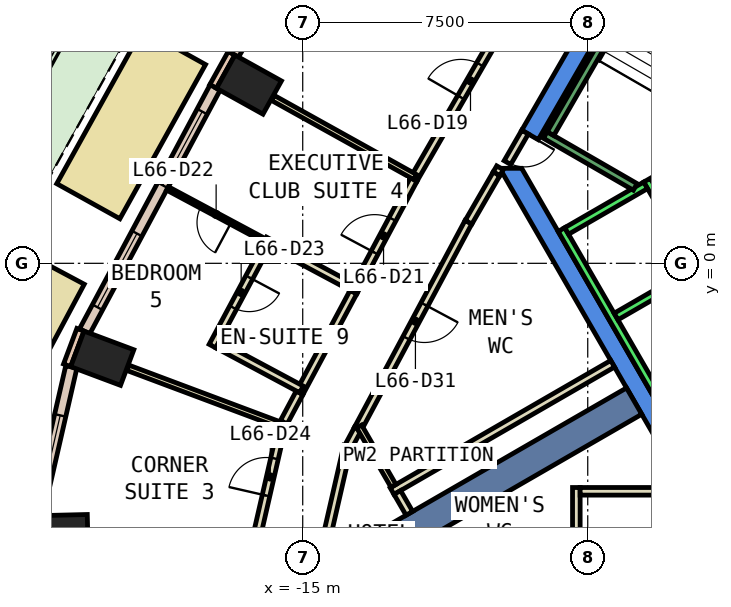
"""IFC4 building model, lengths in metres.
Left out: names, types, materials, properties, quantities, classifications, styles, units other than length and angle.
Written with IfcOpenShell. Run it as: python <this file> out.ifc"""

import sys

from ifc_helpers import new_model, si_unit, direction, frame, frame_2d, origin, origin_2d, place, context, subcontext, project, spatial, polyline, rectangle, outline, extrude, element, fill, save


model = new_model("IFC4")
c1 = context("Model", 3, precision=1e-05, world=origin(), true_north=direction((0.0, 1.0)))
c2 = subcontext(c1, "Body", "Model", "MODEL_VIEW")
j1 = project(units=[si_unit("LENGTHUNIT", "METRE"), si_unit("PLANEANGLEUNIT", "RADIAN")], contexts=[c1])
p1 = place(None, origin())
s1 = spatial("IfcSite", under=j1, at=p1, CompositionType="ELEMENT")
p2 = place(p1, origin())
s2 = spatial("IfcBuilding", under=s1, at=p2, CompositionType="ELEMENT")
p3 = place(p2, frame((0.0, 0.0, 286.4)))
s3 = spatial("IfcBuildingStorey", under=s2, at=p3, CompositionType="ELEMENT", Elevation=286.4)
for number, where, z_axis, x_axis in (
    (1, (-16.415, 4.702, 0.0), (0.0, 0.0, 1.0), (0.486, 0.874, 0.0)),
    (2, (-20.275, -2.497, 0.0), (0.0, 0.0, 1.0), (0.351, 0.936, 0.0)),
    (3, (-21.357, -7.126, 0.0), (0.0, 0.0, 1.0), (-0.024, 1.0, 0.0)),
):
    element("IfcColumn", number, at=place(p3, frame(where, z_axis=z_axis, x_axis=x_axis)), inside=s3, PredefinedType="COLUMN", context=c2, shape_type="SweptSolid", body=[
        extrude(rectangle(XDim=1.0, YDim=1.4, at=origin_2d()), origin(), (0.0, 0.0, 1.0), 3.26),
    ])
p4 = place(p3, frame((0.0, 0.0, -0.6)))
e4 = element("IfcWall", 4, at=p4, inside=s3, PredefinedType="SHEAR", context=c2, shape_type="SweptSolid", body=[
    extrude(outline(polyline([(-9.236, 3.502), (-8.803, 3.253), (-4.619, 10.5), (-4.907, 11.0), (-9.236, 3.502)])), origin(), (0.0, 0.0, 1.0), 3.86),
])
p5 = place(p3, frame((0.0, 0.0, -0.6)))
e5 = element("IfcWall", 5, at=p5, inside=s3, PredefinedType="SHEAR", context=c2, shape_type="SweptSolid", body=[
    extrude(outline(polyline([(-9.815, 2.5), (-4.907, -6.0), (-4.619, -5.5), (-9.238, 2.5), (-9.815, 2.5)])), origin(), (0.0, 0.0, 1.0), 3.86),
])
p6 = place(p3, frame((-6.279, -3.625, -0.6), z_axis=(0.0, 0.0, 1.0), x_axis=(-0.866017533419, -0.500013631625, 0.0)))
e6 = element("IfcWall", 6, at=p6, inside=s3, PredefinedType="SHEAR", context=c2, shape_type="SweptSolid", body=[
    extrude(rectangle(XDim=9.0, YDim=0.8, at=frame_2d((4.5, 0.0))), origin(), (0.0, 0.0, 1.0), 3.86),
])
p7 = place(p3, frame((-16.872, 5.527, 0.0), z_axis=(0.0, 0.0, 1.0), x_axis=(-0.485850211157, -0.874042088414, 0.0)))
e7 = element("IfcWall", 7, at=p7, inside=s3, PredefinedType="STANDARD", context=c2, shape_type="SweptSolid", body=[
    extrude(rectangle(XDim=1.0, YDim=0.2, at=frame_2d((0.5, 0.0))), origin(), (0.0, 0.0, 1.0), 3.26),
])
p8 = place(p3, frame((-20.849, -1.748, 0.0), z_axis=(0.0, 0.0, 1.0), x_axis=(-0.350962844851, -0.936389385637, 0.0)))
e8 = element("IfcWall", 8, at=p8, inside=s3, PredefinedType="STANDARD", context=c2, shape_type="SweptSolid", body=[
    extrude(rectangle(XDim=1.0, YDim=0.2, at=frame_2d((0.5, 0.0))), origin(), (0.0, 0.0, 1.0), 3.26),
])
p9 = place(p3, frame((-13.172, 11.819, 0.0), z_axis=(0.0, 0.0, 1.0), x_axis=(-0.499945412946, -0.866056917341, 0.0)))
e9 = element("IfcWall", 9, at=p9, inside=s3, PredefinedType="STANDARD", context=c2, shape_type="SweptSolid", body=[
    extrude(rectangle(XDim=7.299, YDim=0.3, at=frame_2d((3.649, 0.0))), origin(), (0.0, 0.0, 1.0), 3.26),
])
p10 = place(p9, frame((0.825, 0.0, 0.0)))
e10 = element("IfcOpeningElement", 10, at=p10, cuts=e9, PredefinedType="OPENING", context=c2, shape_type="SweptSolid", body=[
    extrude(rectangle(XDim=2.0, YDim=2.4, at=frame_2d((1.0, 1.2))), frame((0.0, 0.16, 0.0), z_axis=(0.0, -1.0, 0.0), x_axis=(1.0, 0.0, 0.0)), (0.0, 0.0, 1.0), 0.32),
])
p11 = place(p9, frame((4.374, 0.0, 0.9)))
e11 = element("IfcOpeningElement", 11, at=p11, cuts=e9, PredefinedType="OPENING", context=c2, shape_type="SweptSolid", body=[
    extrude(rectangle(XDim=2.2, YDim=2.0, at=frame_2d((1.1, 1.0))), frame((0.0, 0.16, 0.0), z_axis=(0.0, -1.0, 0.0), x_axis=(1.0, 0.0, 0.0)), (0.0, 0.0, 1.0), 0.32),
])
p12 = place(p3, frame((-17.306, 4.626, 0.0), z_axis=(0.0, 0.0, 1.0), x_axis=(-0.471789353675, -0.881711293882, 0.0)))
e12 = element("IfcWall", 12, at=p12, inside=s3, PredefinedType="STANDARD", context=c2, shape_type="SweptSolid", body=[
    extrude(rectangle(XDim=7.277, YDim=0.3, at=frame_2d((3.638, 0.0))), origin(), (0.0, 0.0, 1.0), 3.26),
])
p13 = place(p12, frame((0.719, 0.0, 0.9)))
e13 = element("IfcOpeningElement", 13, at=p13, cuts=e12, PredefinedType="OPENING", context=c2, shape_type="SweptSolid", body=[
    extrude(rectangle(XDim=2.2, YDim=2.0, at=frame_2d((1.1, 1.0))), frame((0.0, 0.16, 0.0), z_axis=(0.0, -1.0, 0.0), x_axis=(1.0, 0.0, 0.0)), (0.0, 0.0, 1.0), 0.32),
])
p14 = place(p12, frame((4.358, 0.0, 0.9)))
e14 = element("IfcOpeningElement", 14, at=p14, cuts=e12, PredefinedType="OPENING", context=c2, shape_type="SweptSolid", body=[
    extrude(rectangle(XDim=2.2, YDim=2.0, at=frame_2d((1.1, 1.0))), frame((0.0, 0.16, 0.0), z_axis=(0.0, -1.0, 0.0), x_axis=(1.0, 0.0, 0.0)), (0.0, 0.0, 1.0), 0.32),
])
p15 = place(p3, frame((-21.089, -2.725, 0.0), z_axis=(0.0, 0.0, 1.0), x_axis=(-0.223448307338, -0.974715781112, 0.0)))
e15 = element("IfcWall", 15, at=p15, inside=s3, PredefinedType="STANDARD", context=c2, shape_type="SweptSolid", body=[
    extrude(rectangle(XDim=4.019, YDim=0.3, at=frame_2d((2.009, 0.0))), origin(), (0.0, 0.0, 1.0), 3.26),
])
p16 = place(p15, frame((1.309, 0.0, 0.9)))
e16 = element("IfcOpeningElement", 16, at=p16, cuts=e15, PredefinedType="OPENING", context=c2, shape_type="SweptSolid", body=[
    extrude(rectangle(XDim=1.4, YDim=2.0, at=frame_2d((0.7, 1.0))), frame((0.0, 0.16, 0.0), z_axis=(0.0, -1.0, 0.0), x_axis=(1.0, 0.0, 0.0)), (0.0, 0.0, 1.0), 0.32),
])
p17 = place(p3, frame((-18.388, 5.691, 0.0), z_axis=(0.0, 0.0, 1.0), x_axis=(-0.485696527213, -0.874127498397, 0.0)))
e17 = element("IfcWall", 17, at=p17, inside=s3, PredefinedType="STANDARD", context=c2, shape_type="SweptSolid", body=[
    extrude(rectangle(XDim=4.641, YDim=1.9, at=frame_2d((2.321, 0.0))), origin(), (0.0, 0.0, 1.0), 0.8),
])
p18 = place(p3, frame((-21.587, -0.103, 0.0), z_axis=(0.0, 0.0, 1.0), x_axis=(-0.470902401725, -0.882185313894, 0.0)))
e18 = element("IfcWall", 18, at=p18, inside=s3, PredefinedType="STANDARD", context=c2, shape_type="SweptSolid", body=[
    extrude(rectangle(XDim=4.799, YDim=1.9, at=frame_2d((2.4, 0.0))), origin(), (0.0, 0.0, 1.0), 0.8),
])
p19 = place(p3, frame((-9.809, 2.514, 0.0), z_axis=(0.0, 0.0, 1.0), x_axis=(-0.497849076449, -0.867263683708, 0.0)))
e19 = element("IfcWall", 19, at=p19, inside=s3, PredefinedType="PARTITIONING", context=c2, shape_type="SweptSolid", body=[
    extrude(rectangle(XDim=0.184, YDim=0.2, at=frame_2d((0.092, 0.0))), origin(), (0.0, 0.0, 1.0), 2.4),
])
p20 = place(p3, frame((-10.639, 1.084, 0.0), z_axis=(0.0, 0.0, 1.0), x_axis=(-0.471696599276, -0.881760918975, 0.0)))
e20 = element("IfcWall", 20, at=p20, inside=s3, PredefinedType="PARTITIONING", context=c2, shape_type="SweptSolid", body=[
    extrude(rectangle(XDim=6.172, YDim=0.2, at=frame_2d((3.086, 0.0))), origin(), (0.0, 0.0, 1.0), 3.26),
])
p21 = place(p20, frame((2.458, 0.0, 0.0)))
e21 = element("IfcOpeningElement", 21, at=p21, cuts=e20, PredefinedType="OPENING", context=c2, shape_type="SweptSolid", body=[
    extrude(rectangle(XDim=1.0, YDim=2.1, at=frame_2d((0.5, 1.05))), frame((0.0, 0.11, 0.0), z_axis=(0.0, -1.0, 0.0), x_axis=(1.0, 0.0, 0.0)), (0.0, 0.0, 1.0), 0.22),
])
p22 = place(p3, frame((-13.55, -4.358, 0.0), z_axis=(0.0, 0.0, 1.0), x_axis=(-0.472169364753, -0.881507850781, 0.0)))
e22 = element("IfcWall", 22, at=p22, inside=s3, PredefinedType="PARTITIONING", context=c2, shape_type="SweptSolid", body=[
    extrude(rectangle(XDim=0.521, YDim=0.2, at=frame_2d((0.26, 0.0))), origin(), (0.0, 0.0, 1.0), 3.26),
])
p23 = place(p3, frame((-13.821, -4.808, 0.0), z_axis=(0.0, 0.0, 1.0), x_axis=(-0.223248099856, -0.97476165595, 0.0)))
e23 = element("IfcWall", 23, at=p23, inside=s3, PredefinedType="PARTITIONING", context=c2, shape_type="SweptSolid", body=[
    extrude(rectangle(XDim=2.302, YDim=0.2, at=frame_2d((1.151, 0.0))), origin(), (0.0, 0.0, 1.0), 3.26),
])
p24 = place(p3, frame((-12.082, 2.207, 0.0), z_axis=(0.0, 0.0, 1.0), x_axis=(0.500123454404, 0.865954115618, 0.0)))
e24 = element("IfcWall", 24, at=p24, inside=s3, PredefinedType="PARTITIONING", context=c2, shape_type="SweptSolid", body=[
    extrude(rectangle(XDim=5.885, YDim=0.2, at=frame_2d((2.942, 0.0))), origin(), (0.0, 0.0, 1.0), 3.26),
])
p25 = place(p24, frame((2.493, 0.0, 0.0)))
e25 = element("IfcOpeningElement", 25, at=p25, cuts=e24, PredefinedType="OPENING", context=c2, shape_type="SweptSolid", body=[
    extrude(rectangle(XDim=1.0, YDim=2.1, at=frame_2d((0.5, 1.05))), frame((0.0, 0.11, 0.0), z_axis=(0.0, -1.0, 0.0), x_axis=(1.0, 0.0, 0.0)), (0.0, 0.0, 1.0), 0.22),
])
p26 = place(p3, frame((-13.666, -0.76, 0.0), z_axis=(0.0, 0.0, 1.0), x_axis=(0.471643060173, 0.881789557543, 0.0)))
e26 = element("IfcWall", 26, at=p26, inside=s3, PredefinedType="PARTITIONING", context=c2, shape_type="SweptSolid", body=[
    extrude(rectangle(XDim=3.363, YDim=0.2, at=frame_2d((1.681, 0.0))), origin(), (0.0, 0.0, 1.0), 3.26),
])
p27 = place(p26, frame((1.181, 0.0, 0.0)))
e27 = element("IfcOpeningElement", 27, at=p27, cuts=e26, PredefinedType="OPENING", context=c2, shape_type="SweptSolid", body=[
    extrude(rectangle(XDim=1.0, YDim=2.1, at=frame_2d((0.5, 1.05))), frame((0.0, 0.11, 0.0), z_axis=(0.0, -1.0, 0.0), x_axis=(1.0, 0.0, 0.0)), (0.0, 0.0, 1.0), 0.22),
])
p28 = place(p3, frame((-15.496, -4.18, 0.0), z_axis=(0.0, 0.0, 1.0), x_axis=(0.471280380621, 0.881983448167, 0.0)))
e28 = element("IfcWall", 28, at=p28, inside=s3, PredefinedType="PARTITIONING", context=c2, shape_type="SweptSolid", body=[
    extrude(rectangle(XDim=0.879, YDim=0.2, at=frame_2d((0.439, 0.0))), origin(), (0.0, 0.0, 1.0), 3.26),
])
p29 = place(p3, frame((-15.082, -3.405, 0.0), z_axis=(0.0, 0.0, 1.0), x_axis=(0.471719946084, 0.88174842924, 0.0)))
e29 = element("IfcWall", 29, at=p29, inside=s3, PredefinedType="PARTITIONING", context=c2, shape_type="SweptSolid", body=[
    extrude(rectangle(XDim=3.0, YDim=0.2, at=frame_2d((1.5, 0.0))), origin(), (0.0, 0.0, 1.0), 3.26),
])
p30 = place(p3, frame((-16.192, -7.098, 0.0), z_axis=(0.0, 0.0, 1.0), x_axis=(0.22330023395, 0.974749714295, 0.0)))
e30 = element("IfcWall", 30, at=p30, inside=s3, PredefinedType="PARTITIONING", context=c2, shape_type="SweptSolid", body=[
    extrude(rectangle(XDim=2.928, YDim=0.2, at=frame_2d((1.464, 0.0))), origin(), (0.0, 0.0, 1.0), 3.26),
])
p31 = place(p30, frame((1.014, 0.0, 0.0)))
e31 = element("IfcOpeningElement", 31, at=p31, cuts=e30, PredefinedType="OPENING", context=c2, shape_type="SweptSolid", body=[
    extrude(rectangle(XDim=1.0, YDim=2.1, at=frame_2d((0.5, 1.05))), frame((0.0, 0.11, 0.0), z_axis=(0.0, -1.0, 0.0), x_axis=(1.0, 0.0, 0.0)), (0.0, 0.0, 1.0), 0.22),
])
p32 = place(p3, frame((-7.8, -9.775, 0.0), z_axis=(0.0, 0.0, 1.0), x_axis=(0.0, 1.0, 0.0)))
e32 = element("IfcWall", 32, at=p32, inside=s3, PredefinedType="PARTITIONING", context=c2, shape_type="SweptSolid", body=[
    extrude(rectangle(XDim=3.876, YDim=0.2, at=frame_2d((1.938, 0.0))), origin(), (0.0, 0.0, 1.0), 3.26),
])
p33 = place(p32, frame((1.438, 0.0, 0.0)))
e33 = element("IfcOpeningElement", 33, at=p33, cuts=e32, PredefinedType="OPENING", context=c2, shape_type="SweptSolid", body=[
    extrude(rectangle(XDim=1.0, YDim=2.1, at=frame_2d((0.5, 1.05))), frame((0.0, 0.11, 0.0), z_axis=(0.0, -1.0, 0.0), x_axis=(1.0, 0.0, 0.0)), (0.0, 0.0, 1.0), 0.22),
])
p34 = place(p3, frame((-7.7, -5.999, 0.0), z_axis=(0.0, 0.0, 1.0), x_axis=(1.0, 0.0, 0.0)))
e34 = element("IfcWall", 34, at=p34, inside=s3, PredefinedType="PARTITIONING", context=c2, shape_type="SweptSolid", body=[
    extrude(rectangle(XDim=2.792, YDim=0.2, at=frame_2d((1.396, 0.0))), origin(), (0.0, 0.0, 1.0), 3.26),
])
p35 = place(p3, frame((-6.845, -2.643, 0.0), z_axis=(0.0, 0.0, 1.0), x_axis=(-0.865994457699, -0.500053596362, 0.0)))
e35 = element("IfcWall", 35, at=p35, inside=s3, PredefinedType="PARTITIONING", context=c2, shape_type="SweptSolid", body=[
    extrude(rectangle(XDim=6.701, YDim=0.2, at=frame_2d((3.351, 0.0))), origin(), (0.0, 0.0, 1.0), 3.26),
])
p36 = place(p3, frame((-12.611, -5.857, 0.0), z_axis=(0.0, 0.0, 1.0), x_axis=(-0.500120037633, 0.865956088932, 0.0)))
e36 = element("IfcWall", 36, at=p36, inside=s3, PredefinedType="PARTITIONING", context=c2, shape_type="SweptSolid", body=[
    extrude(rectangle(XDim=1.807, YDim=0.15, at=frame_2d((0.904, 0.0))), origin(), (0.0, 0.0, 1.0), 3.26),
])
p37 = place(p3, frame((-12.045, 2.272, 0.0), z_axis=(0.0, 0.0, 1.0), x_axis=(-0.873982340973, 0.485957680943, 0.0)))
e37 = element("IfcWall", 37, at=p37, inside=s3, PredefinedType="PARTITIONING", context=c2, shape_type="SweptSolid", body=[
    extrude(rectangle(XDim=4.28, YDim=0.15, at=frame_2d((2.14, 0.0))), origin(), (0.0, 0.0, 1.0), 3.26),
])
p38 = place(p3, frame((-16.0, 0.602, 0.0), z_axis=(0.0, 0.0, 1.0), x_axis=(-0.881743923375, 0.47172836844, 0.0)))
e38 = element("IfcWall", 38, at=p38, inside=s3, PredefinedType="PARTITIONING", context=c2, shape_type="SweptSolid", body=[
    extrude(rectangle(XDim=2.9, YDim=0.1, at=frame_2d((1.45, 0.0))), origin(), (0.0, 0.0, 1.0), 3.26),
])
p39 = place(p38, frame((1.0, 0.0, 0.0)))
e39 = element("IfcOpeningElement", 39, at=p39, cuts=e38, PredefinedType="OPENING", context=c2, shape_type="SweptSolid", body=[
    extrude(rectangle(XDim=0.9, YDim=2.1, at=frame_2d((0.45, 1.05))), frame((0.0, 0.06, 0.0), z_axis=(0.0, -1.0, 0.0), x_axis=(1.0, 0.0, 0.0)), (0.0, 0.0, 1.0), 0.12),
])
p40 = place(p3, frame((-13.707, -0.624, 0.0), z_axis=(0.0, 0.0, 1.0), x_axis=(-0.881825950813, 0.471575012562, 0.0)))
e40 = element("IfcWall", 40, at=p40, inside=s3, PredefinedType="PARTITIONING", context=c2, shape_type="SweptSolid", body=[
    extrude(rectangle(XDim=2.401, YDim=0.2, at=frame_2d((1.2, 0.0))), origin(), (0.0, 0.0, 1.0), 3.26),
])
p41 = place(p3, frame((-15.865, 0.643, 0.0), z_axis=(0.0, 0.0, 1.0), x_axis=(-0.471677088066, -0.881771356188, 0.0)))
e41 = element("IfcWall", 41, at=p41, inside=s3, PredefinedType="PARTITIONING", context=c2, shape_type="SweptSolid", body=[
    extrude(rectangle(XDim=3.199, YDim=0.2, at=frame_2d((1.6, 0.0))), origin(), (0.0, 0.0, 1.0), 3.26),
])
p42 = place(p41, frame((1.15, 0.0, 0.0)))
e42 = element("IfcOpeningElement", 42, at=p42, cuts=e41, PredefinedType="OPENING", context=c2, shape_type="SweptSolid", body=[
    extrude(rectangle(XDim=0.9, YDim=2.1, at=frame_2d((0.45, 1.05))), frame((0.0, 0.11, 0.0), z_axis=(0.0, -1.0, 0.0), x_axis=(1.0, 0.0, 0.0)), (0.0, 0.0, 1.0), 0.22),
])
p43 = place(p3, frame((-17.239, -2.137, 0.0), z_axis=(0.0, 0.0, 1.0), x_axis=(0.881706262609, -0.471798756332, 0.0)))
e43 = element("IfcWall", 43, at=p43, inside=s3, PredefinedType="PARTITIONING", context=c2, shape_type="SweptSolid", body=[
    extrude(rectangle(XDim=2.501, YDim=0.2, at=frame_2d((1.25, 0.0))), origin(), (0.0, 0.0, 1.0), 3.26),
])
p44 = place(p3, frame((-15.45, -4.304, 0.0), z_axis=(0.0, 0.0, 1.0), x_axis=(-0.936458128132, 0.350779381172, 0.0)))
e44 = element("IfcWall", 44, at=p44, inside=s3, PredefinedType="PARTITIONING", context=c2, shape_type="SweptSolid", body=[
    extrude(rectangle(XDim=4.433, YDim=0.15, at=frame_2d((2.216, 0.0))), origin(), (0.0, 0.0, 1.0), 3.26),
])
p45 = place(p3, frame((-9.15, 3.452, 0.0), z_axis=(0.0, 0.0, 1.0), x_axis=(-0.500079945886, -0.865979242085, 0.0)))
e45 = element("IfcWall", 45, at=p45, inside=s3, PredefinedType="PARTITIONING", context=c2, shape_type="SweptSolid", body=[
    extrude(rectangle(XDim=0.926, YDim=0.2, at=frame_2d((0.463, 0.0))), origin(), (0.0, 0.0, 1.0), 2.4),
])
p46 = place(p45, frame((0.017, 0.0, 0.0)))
e46 = element("IfcOpeningElement", 46, at=p46, cuts=e45, PredefinedType="OPENING", context=c2, shape_type="SweptSolid", body=[
    extrude(rectangle(XDim=0.9, YDim=2.1, at=frame_2d((0.45, 1.05))), frame((0.0, 0.11, 0.0), z_axis=(0.0, -1.0, 0.0), x_axis=(1.0, 0.0, 0.0)), (0.0, 0.0, 1.0), 0.22),
])
p47 = place(p3, frame((-12.194, -6.578, 0.0), z_axis=(0.0, 0.0, 1.0), x_axis=(-0.500701704226, 0.865619895442, 0.0)))
e47 = element("IfcWall", 47, at=p47, inside=s3, PredefinedType="PARTITIONING", context=c2, shape_type="SweptSolid", body=[
    extrude(rectangle(XDim=0.633, YDim=0.2, at=frame_2d((0.316, 0.0))), origin(), (0.0, 0.0, 1.0), 3.26),
])
p48 = place(p3, frame((-9.901, 2.354, 0.0), z_axis=(0.0, 0.0, 1.0), x_axis=(-0.500374498448, -0.865809079014, 0.0)))
e48 = element("IfcWall", 48, at=p48, inside=s3, PredefinedType="PARTITIONING", context=c2, shape_type="SweptSolid", body=[
    extrude(rectangle(XDim=1.469, YDim=0.2, at=frame_2d((0.734, 0.0))), origin(), (0.0, 0.0, 1.0), 3.26),
])
p49 = place(p3, frame((-5.94, 2.188, 0.0), z_axis=(0.0, 0.0, 1.0), x_axis=(0.500034260056, -0.866005622828, 0.0)))
e49 = element("IfcWall", 49, at=p49, inside=s3, PredefinedType="STANDARD", context=c2, shape_type="SweptSolid", body=[
    extrude(rectangle(XDim=5.399, YDim=0.2, at=frame_2d((2.7, 0.0))), origin(), (0.0, 0.0, 1.0), 3.26),
])
p50 = place(p49, frame((3.075, 0.0, 0.0)))
e50 = element("IfcOpeningElement", 50, at=p50, cuts=e49, PredefinedType="OPENING", context=c2, shape_type="SweptSolid", body=[
    extrude(rectangle(XDim=1.1, YDim=2.1, at=frame_2d((0.55, 1.05))), frame((0.0, 0.11, 0.0), z_axis=(0.0, -1.0, 0.0), x_axis=(1.0, 0.0, 0.0)), (0.0, 0.0, 1.0), 0.22),
])
p51 = place(p49, frame((1.225, 0.0, 0.0)))
e51 = element("IfcOpeningElement", 51, at=p51, cuts=e49, PredefinedType="OPENING", context=c2, shape_type="SweptSolid", body=[
    extrude(rectangle(XDim=1.1, YDim=2.1, at=frame_2d((0.55, 1.05))), frame((0.0, 0.11, 0.0), z_axis=(0.0, -1.0, 0.0), x_axis=(1.0, 0.0, 0.0)), (0.0, 0.0, 1.0), 0.22),
])
p52 = place(p3, frame((-8.192, 0.888, 0.0), z_axis=(0.0, 0.0, 1.0), x_axis=(0.500034260056, -0.866005622828, 0.0)))
e52 = element("IfcWall", 52, at=p52, inside=s3, PredefinedType="STANDARD", context=c2, shape_type="SweptSolid", body=[
    extrude(rectangle(XDim=5.399, YDim=0.2, at=frame_2d((2.7, 0.0))), origin(), (0.0, 0.0, 1.0), 3.26),
])
for number, where, z_axis, x_axis in (
    (53, (-5.977, 2.052, 0.0), (0.0, 0.0, 1.0), (-0.866, -0.5, 0.0)),
    (54, (-4.677, -0.2, 0.0), (0.0, 0.0, 1.0), (-0.866, -0.5, 0.0)),
):
    element("IfcWall", number, at=place(p3, frame(where, z_axis=z_axis, x_axis=x_axis)), inside=s3, PredefinedType="STANDARD", context=c2, shape_type="SweptSolid", body=[
        extrude(rectangle(XDim=2.399, YDim=0.2, at=frame_2d((1.2, 0.0))), origin(), (0.0, 0.0, 1.0), 3.26),
    ])
p53 = place(p3, frame((-6.25, 2.01, 0.0), z_axis=(0.0, 0.0, 1.0), x_axis=(-0.86611865017, 0.499838457731, 0.0)))
e55 = element("IfcWall", 55, at=p53, inside=s3, PredefinedType="STANDARD", context=c2, shape_type="SweptSolid", body=[
    extrude(rectangle(XDim=2.733, YDim=0.2, at=frame_2d((1.366, 0.0))), origin(), (0.0, 0.0, 1.0), 3.26),
])
p54 = place(p3, frame((-5.03, 9.388, 0.0), z_axis=(0.0, 0.0, 1.0), x_axis=(-0.499978703459, -0.866037698999, 0.0)))
e56 = element("IfcWall", 56, at=p54, inside=s3, PredefinedType="STANDARD", context=c2, shape_type="SweptSolid", body=[
    extrude(rectangle(XDim=6.9, YDim=0.2, at=frame_2d((3.45, 0.0))), origin(), (0.0, 0.0, 1.0), 3.26),
])
p55 = place(p13, origin())
e57 = element("IfcWindow", 57, at=p55, inside=s3, PartitioningType="SINGLE_PANEL", PredefinedType="WINDOW", context=c2, shape_type="SweptSolid", body=[
    extrude(rectangle(XDim=2.2, YDim=2.0, at=frame_2d((1.1, 1.0))), frame((0.0, 0.03, 0.0), z_axis=(0.0, -1.0, 0.0), x_axis=(1.0, 0.0, 0.0)), (0.0, 0.0, 1.0), 0.06),
])
fill(e13, e57)
p56 = place(p14, origin())
e58 = element("IfcWindow", 58, at=p56, inside=s3, PartitioningType="SINGLE_PANEL", PredefinedType="WINDOW", context=c2, shape_type="SweptSolid", body=[
    extrude(rectangle(XDim=2.2, YDim=2.0, at=frame_2d((1.1, 1.0))), frame((0.0, 0.03, 0.0), z_axis=(0.0, -1.0, 0.0), x_axis=(1.0, 0.0, 0.0)), (0.0, 0.0, 1.0), 0.06),
])
fill(e14, e58)
p57 = place(p16, origin())
e59 = element("IfcWindow", 59, at=p57, inside=s3, PartitioningType="SINGLE_PANEL", PredefinedType="WINDOW", context=c2, shape_type="SweptSolid", body=[
    extrude(rectangle(XDim=1.4, YDim=2.0, at=frame_2d((0.7, 1.0))), frame((0.0, 0.03, 0.0), z_axis=(0.0, -1.0, 0.0), x_axis=(1.0, 0.0, 0.0)), (0.0, 0.0, 1.0), 0.06),
])
fill(e16, e59)
p58 = place(p25, origin())
e60 = element("IfcDoor", 60, at=p58, inside=s3, OperationType="SINGLE_SWING_LEFT", PredefinedType="DOOR", context=c2, shape_type="SweptSolid", body=[
    extrude(rectangle(XDim=1.0, YDim=2.1, at=frame_2d((0.5, 1.05))), frame((0.0, 0.025, 0.0), z_axis=(0.0, -1.0, 0.0), x_axis=(1.0, 0.0, 0.0)), (0.0, 0.0, 1.0), 0.05),
])
fill(e25, e60)
p59 = place(p27, origin())
e61 = element("IfcDoor", 61, at=p59, inside=s3, OperationType="SINGLE_SWING_LEFT", PredefinedType="DOOR", context=c2, shape_type="SweptSolid", body=[
    extrude(rectangle(XDim=1.0, YDim=2.1, at=frame_2d((0.5, 1.05))), frame((0.0, 0.025, 0.0), z_axis=(0.0, -1.0, 0.0), x_axis=(1.0, 0.0, 0.0)), (0.0, 0.0, 1.0), 0.05),
])
fill(e27, e61)
p60 = place(p39, origin())
e62 = element("IfcDoor", 62, at=p60, inside=s3, OperationType="SINGLE_SWING_LEFT", PredefinedType="DOOR", context=c2, shape_type="SweptSolid", body=[
    extrude(rectangle(XDim=0.9, YDim=2.1, at=frame_2d((0.45, 1.05))), frame((0.0, 0.025, 0.0), z_axis=(0.0, -1.0, 0.0), x_axis=(1.0, 0.0, 0.0)), (0.0, 0.0, 1.0), 0.05),
])
fill(e39, e62)
p61 = place(p42, origin())
e63 = element("IfcDoor", 63, at=p61, inside=s3, OperationType="SINGLE_SWING_LEFT", PredefinedType="DOOR", context=c2, shape_type="SweptSolid", body=[
    extrude(rectangle(XDim=0.9, YDim=2.1, at=frame_2d((0.45, 1.05))), frame((0.0, 0.025, 0.0), z_axis=(0.0, -1.0, 0.0), x_axis=(1.0, 0.0, 0.0)), (0.0, 0.0, 1.0), 0.05),
])
fill(e42, e63)
p62 = place(p31, origin())
e64 = element("IfcDoor", 64, at=p62, inside=s3, OperationType="SINGLE_SWING_LEFT", PredefinedType="DOOR", context=c2, shape_type="SweptSolid", body=[
    extrude(rectangle(XDim=1.0, YDim=2.1, at=frame_2d((0.5, 1.05))), frame((0.0, 0.025, 0.0), z_axis=(0.0, -1.0, 0.0), x_axis=(1.0, 0.0, 0.0)), (0.0, 0.0, 1.0), 0.05),
])
fill(e31, e64)
p63 = place(p21, origin())
e65 = element("IfcDoor", 65, at=p63, inside=s3, OperationType="SINGLE_SWING_LEFT", PredefinedType="DOOR", context=c2, shape_type="SweptSolid", body=[
    extrude(rectangle(XDim=1.0, YDim=2.1, at=frame_2d((0.5, 1.05))), frame((0.0, 0.025, 0.0), z_axis=(0.0, -1.0, 0.0), x_axis=(1.0, 0.0, 0.0)), (0.0, 0.0, 1.0), 0.05),
])
fill(e21, e65)
p64 = place(p46, origin())
e66 = element("IfcDoor", 66, at=p64, inside=s3, OperationType="SINGLE_SWING_LEFT", PredefinedType="DOOR", context=c2, shape_type="SweptSolid", body=[
    extrude(rectangle(XDim=0.9, YDim=2.1, at=frame_2d((0.45, 1.05))), frame((0.0, 0.025, 0.0), z_axis=(0.0, -1.0, 0.0), x_axis=(1.0, 0.0, 0.0)), (0.0, 0.0, 1.0), 0.05),
])
fill(e46, e66)
save(model, sys.argv[1])
